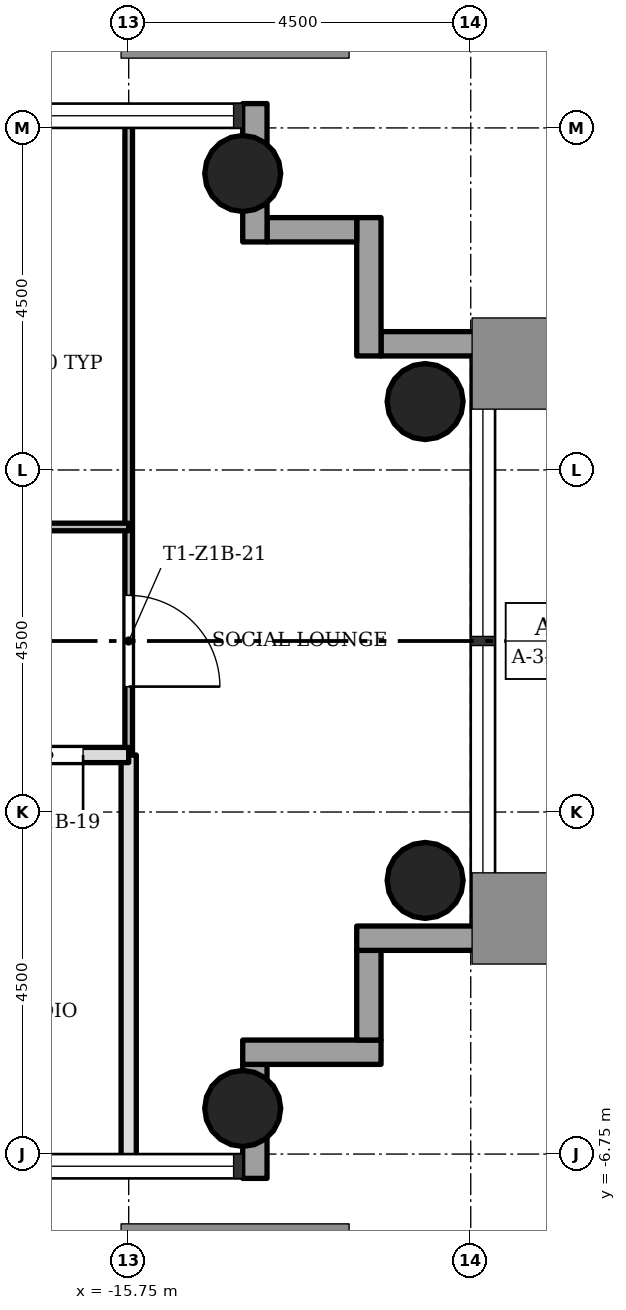
"""IFC4 building model, lengths in metres.
Left out: names, types, materials, properties, quantities, classifications, styles, units other than length and angle.
Written with IfcOpenShell. Run it as: python <this file> out.ifc"""

import sys

from ifc_helpers import new_model, si_unit, direction, frame, frame_2d, origin, origin_2d, place, context, subcontext, project, spatial, rectangle, hollow_circle, extrude, element, fill, save


model = new_model("IFC4")
c1 = context("Model", 3, precision=1e-05, world=origin(), true_north=direction((0.0, 1.0)))
c2 = subcontext(c1, "Body", "Model", "MODEL_VIEW")
j1 = project(units=[si_unit("LENGTHUNIT", "METRE"), si_unit("PLANEANGLEUNIT", "RADIAN")], contexts=[c1])
p1 = place(None, origin())
s1 = spatial("IfcSite", under=j1, at=p1, CompositionType="ELEMENT")
p2 = place(p1, origin())
s2 = spatial("IfcBuilding", under=s1, at=p2, CompositionType="ELEMENT")
p3 = place(p2, frame((0.0, 0.0, 38.1)))
s3 = spatial("IfcBuildingStorey", under=s2, at=p3, CompositionType="ELEMENT", Elevation=38.1)
for number, where, z_axis, x_axis in (
    (1, (-14.25, -6.15, 0.0), (0.0, 0.0, 1.0), (1.0, 0.0, 0.0)),
    (2, (-14.25, 6.15, 0.0), (0.0, 0.0, 1.0), (1.0, 0.0, 0.0)),
    (3, (-11.85, -3.15, 0.0), (0.0, 0.0, 1.0), (1.0, 0.0, 0.0)),
    (4, (-11.85, 3.15, 0.0), (0.0, 0.0, 1.0), (1.0, 0.0, 0.0)),
):
    element("IfcColumn", number, at=place(p3, frame(where, z_axis=z_axis, x_axis=x_axis)), inside=s3, PredefinedType="COLUMN", context=c2, shape_type="SweptSolid", body=[
        extrude(hollow_circle(Radius=0.5, WallThickness=0.036, at=origin_2d()), origin(), (0.0, 0.0, 1.0), 3.4),
    ])
p4 = place(p3, frame((-14.09, -7.07, -0.3), z_axis=(0.0, 0.0, 1.0), x_axis=(0.0, 1.0, 0.0)))
e5 = element("IfcWall", 5, at=p4, inside=s3, PredefinedType="STANDARD", context=c2, shape_type="SweptSolid", body=[
    extrude(rectangle(XDim=1.5, YDim=0.32, at=frame_2d((0.75, 0.0))), origin(), (0.0, 0.0, 1.0), 3.4),
])
p5 = place(p3, frame((-14.25, -5.41, -0.3), z_axis=(0.0, 0.0, 1.0), x_axis=(1.0, 0.0, 0.0)))
e6 = element("IfcWall", 6, at=p5, inside=s3, PredefinedType="STANDARD", context=c2, shape_type="SweptSolid", body=[
    extrude(rectangle(XDim=1.82, YDim=0.32, at=frame_2d((0.91, 0.0))), origin(), (0.0, 0.0, 1.0), 3.4),
])
p6 = place(p3, frame((-12.59, -5.25, -0.3), z_axis=(0.0, 0.0, 1.0), x_axis=(0.0, 1.0, 0.0)))
e7 = element("IfcWall", 7, at=p6, inside=s3, PredefinedType="STANDARD", context=c2, shape_type="SweptSolid", body=[
    extrude(rectangle(XDim=1.18, YDim=0.32, at=frame_2d((0.59, 0.0))), origin(), (0.0, 0.0, 1.0), 3.4),
])
p7 = place(p3, frame((-12.75, -3.91, -0.3), z_axis=(0.0, 0.0, 1.0), x_axis=(1.0, 0.0, 0.0)))
e8 = element("IfcWall", 8, at=p7, inside=s3, PredefinedType="STANDARD", context=c2, shape_type="SweptSolid", body=[
    extrude(rectangle(XDim=1.82, YDim=0.32, at=frame_2d((0.91, 0.0))), origin(), (0.0, 0.0, 1.0), 3.4),
])
p8 = place(p3, frame((-10.93, 3.91, -0.3), z_axis=(0.0, 0.0, 1.0), x_axis=(-1.0, 0.0, 0.0)))
e9 = element("IfcWall", 9, at=p8, inside=s3, PredefinedType="STANDARD", context=c2, shape_type="SweptSolid", body=[
    extrude(rectangle(XDim=1.5, YDim=0.32, at=frame_2d((0.75, 0.0))), origin(), (0.0, 0.0, 1.0), 3.4),
])
p9 = place(p3, frame((-12.59, 3.75, -0.3), z_axis=(0.0, 0.0, 1.0), x_axis=(0.0, 1.0, 0.0)))
e10 = element("IfcWall", 10, at=p9, inside=s3, PredefinedType="STANDARD", context=c2, shape_type="SweptSolid", body=[
    extrude(rectangle(XDim=1.82, YDim=0.32, at=frame_2d((0.91, 0.0))), origin(), (0.0, 0.0, 1.0), 3.4),
])
p10 = place(p3, frame((-12.75, 5.41, -0.3), z_axis=(0.0, 0.0, 1.0), x_axis=(-1.0, 0.0, 0.0)))
e11 = element("IfcWall", 11, at=p10, inside=s3, PredefinedType="STANDARD", context=c2, shape_type="SweptSolid", body=[
    extrude(rectangle(XDim=1.18, YDim=0.32, at=frame_2d((0.59, 0.0))), origin(), (0.0, 0.0, 1.0), 3.4),
])
p11 = place(p3, frame((-14.09, 5.25, -0.3), z_axis=(0.0, 0.0, 1.0), x_axis=(0.0, 1.0, 0.0)))
e12 = element("IfcWall", 12, at=p11, inside=s3, PredefinedType="STANDARD", context=c2, shape_type="SweptSolid", body=[
    extrude(rectangle(XDim=1.82, YDim=0.32, at=frame_2d((0.91, 0.0))), origin(), (0.0, 0.0, 1.0), 3.4),
])
p12 = place(p3, frame((-15.75, -1.5, 0.0), z_axis=(0.0, 0.0, 1.0), x_axis=(0.0, 1.0, 0.0)))
e13 = element("IfcWall", 13, at=p12, inside=s3, PredefinedType="PARTITIONING", context=c2, shape_type="SweptSolid", body=[
    extrude(rectangle(XDim=8.35, YDim=0.1, at=frame_2d((4.175, 0.0))), origin(), (0.0, 0.0, 1.0), 3.0),
])
p13 = place(p12, frame((0.9, 0.0, 0.0)))
e14 = element("IfcOpeningElement", 14, at=p13, cuts=e13, PredefinedType="OPENING", context=c2, shape_type="SweptSolid", body=[
    extrude(rectangle(XDim=1.2, YDim=2.1, at=frame_2d((0.6, 1.05))), frame((0.0, 0.06, 0.0), z_axis=(0.0, -1.0, 0.0), x_axis=(1.0, 0.0, 0.0)), (0.0, 0.0, 1.0), 0.12),
])
p14 = place(p3, frame((-15.75, -6.85, 0.0), z_axis=(0.0, 0.0, 1.0), x_axis=(0.0, 1.0, 0.0)))
e15 = element("IfcWall", 15, at=p14, inside=s3, PredefinedType="SOLIDWALL", context=c2, shape_type="SweptSolid", body=[
    extrude(rectangle(XDim=5.35, YDim=0.2, at=frame_2d((2.675, 0.0))), origin(), (0.0, 0.0, 1.0), 3.0),
])
p15 = place(p3, frame((-20.25, -1.5, 0.0), z_axis=(0.0, 0.0, 1.0), x_axis=(1.0, 0.0, 0.0)))
e16 = element("IfcWall", 16, at=p15, inside=s3, PredefinedType="SOLIDWALL", context=c2, shape_type="SweptSolid", body=[
    extrude(rectangle(XDim=4.5, YDim=0.2, at=frame_2d((2.25, 0.0))), origin(), (0.0, 0.0, 1.0), 3.0),
])
p16 = place(p15, frame((3.0, 0.0, 0.0)))
e17 = element("IfcOpeningElement", 17, at=p16, cuts=e16, PredefinedType="OPENING", context=c2, shape_type="SweptSolid", body=[
    extrude(rectangle(XDim=0.9, YDim=2.1, at=frame_2d((0.45, 1.05))), frame((0.0, 0.11, 0.0), z_axis=(0.0, -1.0, 0.0), x_axis=(1.0, 0.0, 0.0)), (0.0, 0.0, 1.0), 0.22),
])
p17 = place(p3, frame((-20.25, 1.5, 0.0), z_axis=(0.0, 0.0, 1.0), x_axis=(1.0, 0.0, 0.0)))
e18 = element("IfcWall", 18, at=p17, inside=s3, PredefinedType="PARTITIONING", context=c2, shape_type="SweptSolid", body=[
    extrude(rectangle(XDim=4.5, YDim=0.1, at=frame_2d((2.25, 0.0))), origin(), (0.0, 0.0, 1.0), 3.0),
])
p18 = place(p17, frame((1.8, 0.0, 0.0)))
e19 = element("IfcOpeningElement", 19, at=p18, cuts=e18, PredefinedType="OPENING", context=c2, shape_type="SweptSolid", body=[
    extrude(rectangle(XDim=0.9, YDim=2.1, at=frame_2d((0.45, 1.05))), frame((0.0, 0.06, 0.0), z_axis=(0.0, -1.0, 0.0), x_axis=(1.0, 0.0, 0.0)), (0.0, 0.0, 1.0), 0.12),
])
p19 = place(p16, origin())
e20 = element("IfcDoor", 20, at=p19, inside=s3, OperationType="SINGLE_SWING_RIGHT", PredefinedType="DOOR", context=c2, shape_type="SweptSolid", body=[
    extrude(rectangle(XDim=0.9, YDim=2.1, at=frame_2d((0.45, 1.05))), frame((0.0, 0.025, 0.0), z_axis=(0.0, -1.0, 0.0), x_axis=(1.0, 0.0, 0.0)), (0.0, 0.0, 1.0), 0.05),
])
fill(e17, e20)
p20 = place(p13, origin())
e21 = element("IfcDoor", 21, at=p20, inside=s3, OperationType="SINGLE_SWING_LEFT", PredefinedType="DOOR", context=c2, shape_type="SweptSolid", body=[
    extrude(rectangle(XDim=1.2, YDim=2.1, at=frame_2d((0.6, 1.05))), frame((0.0, 0.025, 0.0), z_axis=(0.0, -1.0, 0.0), x_axis=(1.0, 0.0, 0.0)), (0.0, 0.0, 1.0), 0.05),
])
fill(e14, e21)
save(model, sys.argv[1])
